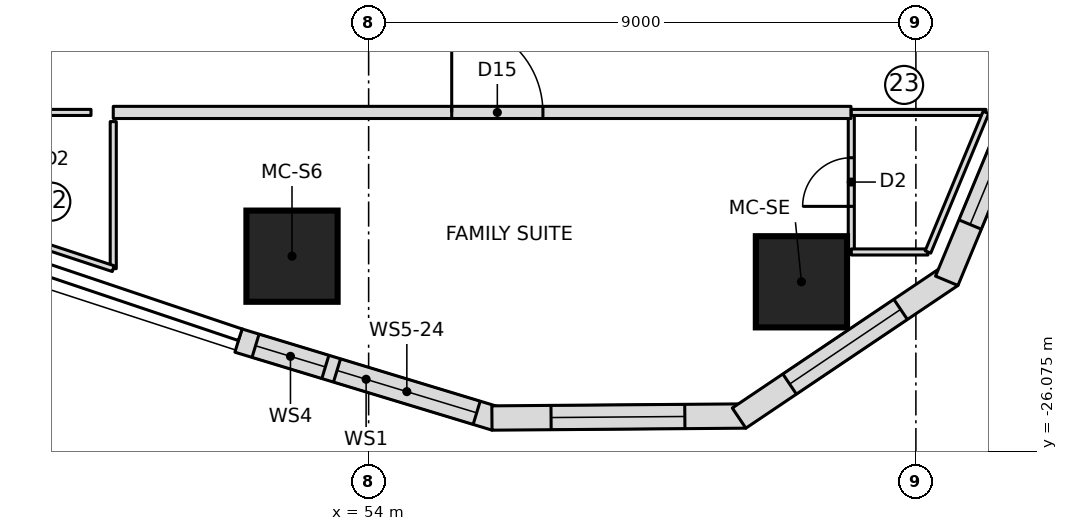
"""IFC4 building model, lengths in metres.
Left out: names, types, materials, properties, quantities, classifications, styles, units other than length and angle.
Written with IfcOpenShell. Run it as: python <this file> out.ifc"""

import sys

from ifc_helpers import new_model, si_unit, direction, frame, frame_2d, origin, origin_2d, place, context, subcontext, project, spatial, polyline, rectangle, outline, extrude, element, fill, save


model = new_model("IFC4")
c1 = context("Model", 3, precision=1e-05, world=origin(), true_north=direction((0.0, 1.0)))
c2 = subcontext(c1, "Body", "Model", "MODEL_VIEW")
j1 = project(units=[si_unit("LENGTHUNIT", "METRE"), si_unit("PLANEANGLEUNIT", "RADIAN")], contexts=[c1])
p1 = place(None, origin())
s1 = spatial("IfcSite", under=j1, at=p1, CompositionType="ELEMENT")
p2 = place(p1, origin())
s2 = spatial("IfcBuilding", under=s1, at=p2, CompositionType="ELEMENT")
p3 = place(p2, frame((0.0, 0.0, 162.15)))
s3 = spatial("IfcBuildingStorey", under=s2, at=p3, CompositionType="ELEMENT", Elevation=162.15)
for number, where, z_axis, x_axis in (
    (1, (52.74, -22.869, 0.0), (0.0, 0.0, 1.0), (1.0, 0.0, 0.0)),
    (2, (61.117, -23.291, 0.0), (0.0, 0.0, 1.0), (1.0, 0.0, 0.0)),
):
    element("IfcColumn", number, at=place(p3, frame(where, z_axis=z_axis, x_axis=x_axis)), inside=s3, PredefinedType="COLUMN", context=c2, shape_type="SweptSolid", body=[
        extrude(rectangle(XDim=1.5, YDim=1.5, at=origin_2d()), origin(), (0.0, 0.0, 1.0), 3.55),
    ])
p4 = place(p3, frame((51.859, -24.257, 0.0), z_axis=(0.0, 0.0, 1.0), x_axis=(0.956964488344, -0.290205044837, 0.0)))
e3 = element("IfcWall", 3, at=p4, inside=s3, PredefinedType="NOTDEFINED", context=c2, shape_type="SweptSolid", body=[
    extrude(outline(polyline([(0.0, -0.2), (4.418, -0.2), (4.357, 0.2), (0.0, 0.2), (0.0, -0.2)])), origin(), (0.0, 0.0, 1.0), 3.25),
])
p5 = place(p4, frame((0.294, 0.0, 0.9)))
e4 = element("IfcOpeningElement", 4, at=p5, cuts=e3, PredefinedType="OPENING", context=c2, shape_type="SweptSolid", body=[
    extrude(rectangle(XDim=1.2, YDim=1.8, at=frame_2d((0.6, 0.9))), frame((0.0, 0.21, 0.0), z_axis=(0.0, -1.0, 0.0), x_axis=(1.0, 0.0, 0.0)), (0.0, 0.0, 1.0), 0.42),
])
p6 = place(p4, frame((1.694, 0.0, 0.9)))
e5 = element("IfcOpeningElement", 5, at=p6, cuts=e3, PredefinedType="OPENING", context=c2, shape_type="SweptSolid", body=[
    extrude(rectangle(XDim=2.4, YDim=1.8, at=frame_2d((1.2, 0.9))), frame((0.0, 0.21, 0.0), z_axis=(0.0, -1.0, 0.0), x_axis=(1.0, 0.0, 0.0)), (0.0, 0.0, 1.0), 0.42),
])
p7 = place(p3, frame((56.058, -25.531, 0.0), z_axis=(0.0, 0.0, 1.0), x_axis=(0.99996933771, 0.007830941131, 0.0)))
e6 = element("IfcWall", 6, at=p7, inside=s3, PredefinedType="NOTDEFINED", context=c2, shape_type="SweptSolid", body=[
    extrude(outline(polyline([(-0.031, -0.2), (4.145, -0.2), (4.024, 0.2), (0.031, 0.2), (-0.031, -0.2)])), origin(), (0.0, 0.0, 1.0), 3.25),
])
p8 = place(p7, frame((0.942, 0.0, 0.6)))
e7 = element("IfcOpeningElement", 7, at=p8, cuts=e6, PredefinedType="OPENING", context=c2, shape_type="SweptSolid", body=[
    extrude(outline(polyline([(0.0, 1.35), (0.084, 1.771), (0.322, 2.128), (0.679, 2.366), (1.1, 2.45), (1.521, 2.366), (1.878, 2.128), (2.116, 1.771), (2.2, 1.35), (2.2, 1.1), (2.116, 0.679), (1.878, 0.322), (1.521, 0.084), (1.1, 0.0), (0.679, 0.084), (0.322, 0.322), (0.084, 0.679), (0.0, 1.1), (0.0, 1.35)])), frame((0.0, 0.21, 0.0), z_axis=(0.0, -1.0, 0.0), x_axis=(1.0, 0.0, 0.0)), (0.0, 0.0, 1.0), 0.42),
])
p9 = place(p3, frame((60.142, -25.499, 0.0), z_axis=(0.0, 0.0, 1.0), x_axis=(0.829642062482, 0.558295663749, 0.0)))
e8 = element("IfcWall", 8, at=p9, inside=s3, PredefinedType="NOTDEFINED", context=c2, shape_type="SweptSolid", body=[
    extrude(outline(polyline([(-0.06, -0.2), (4.144, -0.2), (4.024, 0.2), (0.06, 0.2), (-0.06, -0.2)])), origin(), (0.0, 0.0, 1.0), 3.25),
])
p10 = place(p9, frame((0.942, 0.0, 0.6)))
e9 = element("IfcOpeningElement", 9, at=p10, cuts=e8, PredefinedType="OPENING", context=c2, shape_type="SweptSolid", body=[
    extrude(outline(polyline([(0.0, 1.35), (0.084, 1.771), (0.322, 2.128), (0.679, 2.366), (1.1, 2.45), (1.521, 2.366), (1.878, 2.128), (2.116, 1.771), (2.2, 1.35), (2.2, 1.1), (2.116, 0.679), (1.878, 0.322), (1.521, 0.084), (1.1, 0.0), (0.679, 0.084), (0.322, 0.322), (0.084, 0.679), (0.0, 1.1), (0.0, 1.35)])), frame((0.0, 0.21, 0.0), z_axis=(0.0, -1.0, 0.0), x_axis=(1.0, 0.0, 0.0)), (0.0, 0.0, 1.0), 0.42),
])
p11 = place(p3, frame((63.53, -23.219, 0.0), z_axis=(0.0, 0.0, 1.0), x_axis=(0.383817293519, 0.923409056267, 0.0)))
e10 = element("IfcWall", 10, at=p11, inside=s3, PredefinedType="NOTDEFINED", context=c2, shape_type="SweptSolid", body=[
    extrude(outline(polyline([(-0.06, -0.2), (4.115, -0.2), (4.054, 0.2), (0.06, 0.2), (-0.06, -0.2)])), origin(), (0.0, 0.0, 1.0), 3.25),
])
p12 = place(p11, frame((0.942, 0.0, 0.6)))
e11 = element("IfcOpeningElement", 11, at=p12, cuts=e10, PredefinedType="OPENING", context=c2, shape_type="SweptSolid", body=[
    extrude(outline(polyline([(0.0, 1.35), (0.084, 1.771), (0.322, 2.128), (0.679, 2.366), (1.1, 2.45), (1.521, 2.366), (1.878, 2.128), (2.116, 1.771), (2.2, 1.35), (2.2, 1.1), (2.116, 0.679), (1.878, 0.322), (1.521, 0.084), (1.1, 0.0), (0.679, 0.084), (0.322, 0.322), (0.084, 0.679), (0.0, 1.1), (0.0, 1.35)])), frame((0.0, 0.21, 0.0), z_axis=(0.0, -1.0, 0.0), x_axis=(1.0, 0.0, 0.0)), (0.0, 0.0, 1.0), 0.42),
])
p13 = place(p3, frame((61.938, -22.8, 0.0), z_axis=(0.0, 0.0, 1.0), x_axis=(0.0, 1.0, 0.0)))
e12 = element("IfcWall", 12, at=p13, inside=s3, PredefinedType="PARTITIONING", context=c2, shape_type="SweptSolid", body=[
    extrude(rectangle(XDim=2.3, YDim=0.1, at=frame_2d((1.15, 0.0))), origin(), (0.0, 0.0, 1.0), 3.15),
])
p14 = place(p13, frame((0.75, 0.0, 0.0)))
e13 = element("IfcOpeningElement", 13, at=p14, cuts=e12, PredefinedType="OPENING", context=c2, shape_type="SweptSolid", body=[
    extrude(rectangle(XDim=0.8, YDim=2.1, at=frame_2d((0.4, 1.05))), frame((0.0, 0.06, 0.0), z_axis=(0.0, -1.0, 0.0), x_axis=(1.0, 0.0, 0.0)), (0.0, 0.0, 1.0), 0.12),
])
p15 = place(p3, frame((63.198, -22.8, 0.0), z_axis=(0.0, 0.0, 1.0), x_axis=(-1.0, 0.0, 0.0)))
e14 = element("IfcWall", 14, at=p15, inside=s3, PredefinedType="PARTITIONING", context=c2, shape_type="SweptSolid", body=[
    extrude(rectangle(XDim=1.261, YDim=0.1, at=frame_2d((0.63, 0.0))), origin(), (0.0, 0.0, 1.0), 3.15),
])
p16 = place(p3, frame((49.8, -20.505, 0.0), z_axis=(0.0, 0.0, 1.0), x_axis=(1.0, 0.0, 0.0)))
e15 = element("IfcWall", 15, at=p16, inside=s3, PredefinedType="PARTITIONING", context=c2, shape_type="SweptSolid", body=[
    extrude(rectangle(XDim=12.133, YDim=0.2, at=frame_2d((6.066, 0.0))), origin(), (0.0, 0.0, 1.0), 3.15),
])
p17 = place(p16, frame((5.566, 0.0, 0.0)))
e16 = element("IfcOpeningElement", 16, at=p17, cuts=e15, PredefinedType="OPENING", context=c2, shape_type="SweptSolid", body=[
    extrude(rectangle(XDim=1.5, YDim=2.1, at=frame_2d((0.75, 1.05))), frame((0.0, 0.11, 0.0), z_axis=(0.0, -1.0, 0.0), x_axis=(1.0, 0.0, 0.0)), (0.0, 0.0, 1.0), 0.22),
])
p18 = place(p3, frame((61.938, -20.505, 0.0), z_axis=(0.0, 0.0, 1.0), x_axis=(1.0, 0.0, 0.0)))
e17 = element("IfcWall", 17, at=p18, inside=s3, PredefinedType="PARTITIONING", context=c2, shape_type="SweptSolid", body=[
    extrude(rectangle(XDim=2.215, YDim=0.1, at=frame_2d((1.107, 0.0))), origin(), (0.0, 0.0, 1.0), 3.15),
])
p19 = place(p3, frame((64.152, -20.505, 0.0), z_axis=(0.0, 0.0, 1.0), x_axis=(-0.383855043906, -0.923393364319, 0.0)))
e18 = element("IfcWall", 18, at=p19, inside=s3, PredefinedType="PARTITIONING", context=c2, shape_type="SweptSolid", body=[
    extrude(rectangle(XDim=2.486, YDim=0.1, at=frame_2d((1.243, 0.0))), origin(), (0.0, 0.0, 1.0), 3.15),
])
p20 = place(p3, frame((48.299, -20.505, 0.0), z_axis=(0.0, 0.0, 1.0), x_axis=(1.0, 0.0, 0.0)))
e19 = element("IfcWall", 19, at=p20, inside=s3, PredefinedType="PARTITIONING", context=c2, shape_type="SweptSolid", body=[
    extrude(rectangle(XDim=1.135, YDim=0.1, at=frame_2d((0.568, 0.0))), origin(), (0.0, 0.0, 1.0), 3.15),
])
p21 = place(p3, frame((49.8, -20.656, 0.0), z_axis=(0.0, 0.0, 1.0), x_axis=(0.0, -1.0, 0.0)))
e20 = element("IfcWall", 20, at=p21, inside=s3, PredefinedType="PARTITIONING", context=c2, shape_type="SweptSolid", body=[
    extrude(rectangle(XDim=2.418, YDim=0.1, at=frame_2d((1.209, 0.0))), origin(), (0.0, 0.0, 1.0), 3.15),
])
p22 = place(p3, frame((49.8, -23.074, 0.0), z_axis=(0.0, 0.0, 1.0), x_axis=(-0.949844078437, 0.312723882455, 0.0)))
e21 = element("IfcWall", 21, at=p22, inside=s3, PredefinedType="PARTITIONING", context=c2, shape_type="SweptSolid", body=[
    extrude(rectangle(XDim=2.51, YDim=0.1, at=frame_2d((1.255, 0.0))), origin(), (0.0, 0.0, 1.0), 3.15),
])
p23 = place(p5, origin())
e22 = element("IfcWindow", 22, at=p23, inside=s3, PartitioningType="SINGLE_PANEL", PredefinedType="WINDOW", context=c2, shape_type="SweptSolid", body=[
    extrude(rectangle(XDim=1.2, YDim=1.8, at=frame_2d((0.6, 0.9))), frame((0.0, 0.17, 0.0), z_axis=(0.0, -1.0, 0.0), x_axis=(1.0, 0.0, 0.0)), (0.0, 0.0, 1.0), 0.06),
])
fill(e4, e22)
p24 = place(p6, origin())
e23 = element("IfcWindow", 23, at=p24, inside=s3, PartitioningType="SINGLE_PANEL", PredefinedType="WINDOW", context=c2, shape_type="SweptSolid", body=[
    extrude(rectangle(XDim=2.4, YDim=1.8, at=frame_2d((1.2, 0.9))), frame((0.0, 0.17, 0.0), z_axis=(0.0, -1.0, 0.0), x_axis=(1.0, 0.0, 0.0)), (0.0, 0.0, 1.0), 0.06),
])
fill(e5, e23)
p25 = place(p8, origin())
e24 = element("IfcWindow", 24, at=p25, inside=s3, PartitioningType="SINGLE_PANEL", PredefinedType="WINDOW", context=c2, shape_type="SweptSolid", body=[
    extrude(outline(polyline([(0.0, 1.35), (0.084, 1.771), (0.322, 2.128), (0.679, 2.366), (1.1, 2.45), (1.521, 2.366), (1.878, 2.128), (2.116, 1.771), (2.2, 1.35), (2.2, 1.1), (2.116, 0.679), (1.878, 0.322), (1.521, 0.084), (1.1, 0.0), (0.679, 0.084), (0.322, 0.322), (0.084, 0.679), (0.0, 1.1), (0.0, 1.35)])), frame((0.0, 0.17, 0.0), z_axis=(0.0, -1.0, 0.0), x_axis=(1.0, 0.0, 0.0)), (0.0, 0.0, 1.0), 0.06),
])
fill(e7, e24)
p26 = place(p10, origin())
e25 = element("IfcWindow", 25, at=p26, inside=s3, PartitioningType="SINGLE_PANEL", PredefinedType="WINDOW", context=c2, shape_type="SweptSolid", body=[
    extrude(outline(polyline([(0.0, 1.35), (0.084, 1.771), (0.322, 2.128), (0.679, 2.366), (1.1, 2.45), (1.521, 2.366), (1.878, 2.128), (2.116, 1.771), (2.2, 1.35), (2.2, 1.1), (2.116, 0.679), (1.878, 0.322), (1.521, 0.084), (1.1, 0.0), (0.679, 0.084), (0.322, 0.322), (0.084, 0.679), (0.0, 1.1), (0.0, 1.35)])), frame((0.0, 0.17, 0.0), z_axis=(0.0, -1.0, 0.0), x_axis=(1.0, 0.0, 0.0)), (0.0, 0.0, 1.0), 0.06),
])
fill(e9, e25)
p27 = place(p12, origin())
e26 = element("IfcWindow", 26, at=p27, inside=s3, PartitioningType="SINGLE_PANEL", PredefinedType="WINDOW", context=c2, shape_type="SweptSolid", body=[
    extrude(outline(polyline([(0.0, 1.35), (0.084, 1.771), (0.322, 2.128), (0.679, 2.366), (1.1, 2.45), (1.521, 2.366), (1.878, 2.128), (2.116, 1.771), (2.2, 1.35), (2.2, 1.1), (2.116, 0.679), (1.878, 0.322), (1.521, 0.084), (1.1, 0.0), (0.679, 0.084), (0.322, 0.322), (0.084, 0.679), (0.0, 1.1), (0.0, 1.35)])), frame((0.0, 0.17, 0.0), z_axis=(0.0, -1.0, 0.0), x_axis=(1.0, 0.0, 0.0)), (0.0, 0.0, 1.0), 0.06),
])
fill(e11, e26)
p28 = place(p14, origin())
e27 = element("IfcDoor", 27, at=p28, inside=s3, OperationType="SINGLE_SWING_LEFT", PredefinedType="DOOR", context=c2, shape_type="SweptSolid", body=[
    extrude(rectangle(XDim=0.8, YDim=2.1, at=frame_2d((0.4, 1.05))), frame((0.0, 0.025, 0.0), z_axis=(0.0, -1.0, 0.0), x_axis=(1.0, 0.0, 0.0)), (0.0, 0.0, 1.0), 0.05),
])
fill(e13, e27)
p29 = place(p17, origin())
e28 = element("IfcDoor", 28, at=p29, inside=s3, OperationType="DOUBLE_DOOR_SINGLE_SWING", PredefinedType="DOOR", context=c2, shape_type="SweptSolid", body=[
    extrude(rectangle(XDim=1.5, YDim=2.1, at=frame_2d((0.75, 1.05))), frame((0.0, 0.025, 0.0), z_axis=(0.0, -1.0, 0.0), x_axis=(1.0, 0.0, 0.0)), (0.0, 0.0, 1.0), 0.05),
])
fill(e16, e28)
save(model, sys.argv[1])
